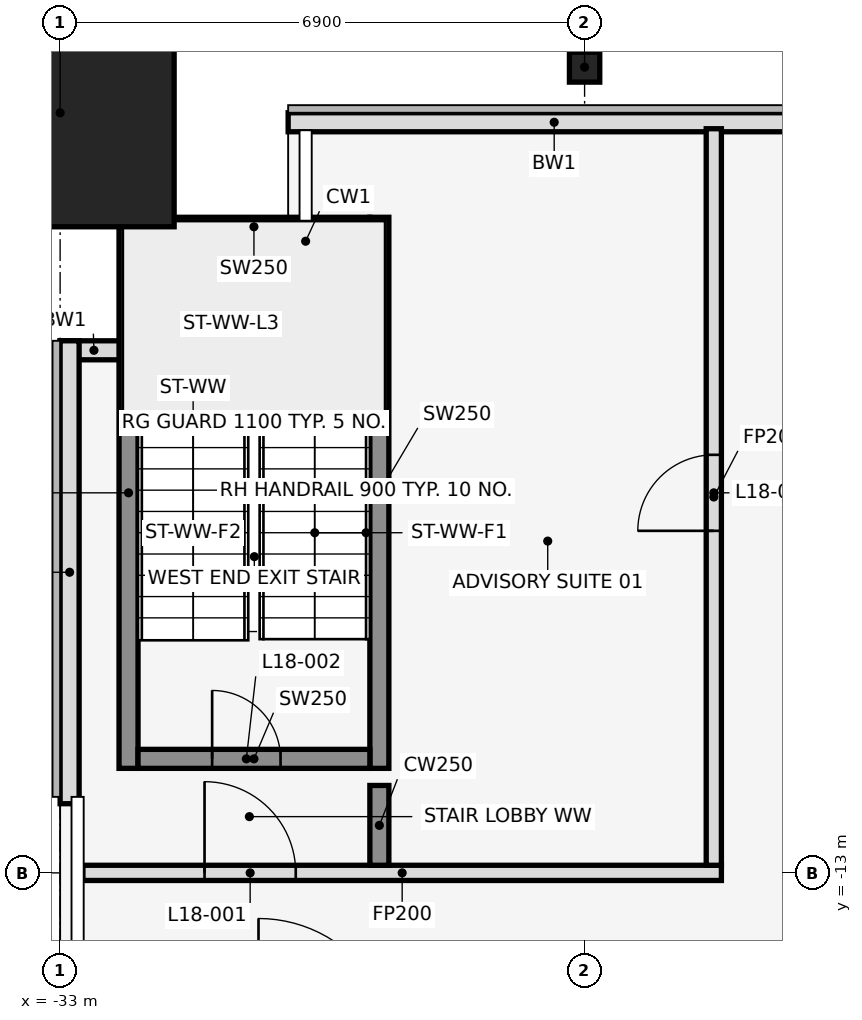
"""IFC4 building model, lengths in metres.
Left out: names, types, materials, properties, quantities, classifications, styles, units other than length and angle.
Written with IfcOpenShell. Run it as: python <this file> out.ifc"""

import sys

from ifc_helpers import new_model, si_unit, direction, frame, frame_2d, origin, origin_2d, place, context, subcontext, project, spatial, rectangle, hollow_rectangle, i_section, extrude, element, fill, save


model = new_model("IFC4")
c1 = context("Model", 3, precision=1e-05, world=origin(), true_north=direction((0.0, 1.0)))
c2 = subcontext(c1, "Body", "Model", "MODEL_VIEW")
j1 = project(units=[si_unit("LENGTHUNIT", "METRE"), si_unit("PLANEANGLEUNIT", "RADIAN")], contexts=[c1])
p1 = place(None, origin())
s1 = spatial("IfcSite", under=j1, at=p1, CompositionType="ELEMENT")
p2 = place(p1, origin())
s2 = spatial("IfcBuilding", under=s1, at=p2, CompositionType="ELEMENT")
p3 = place(p2, frame((0.0, 0.0, 89.9)))
s3 = spatial("IfcBuildingStorey", under=s2, at=p3, CompositionType="ELEMENT", Elevation=89.9)
p4 = place(p3, frame((-33.0, -3.0, 0.0), z_axis=(0.0, 0.0, 1.0), x_axis=(1.0, 0.0, 0.0)))
e1 = element("IfcColumn", 1, at=p4, inside=s3, PredefinedType="COLUMN", context=c2, shape_type="SweptSolid", body=[
    extrude(hollow_rectangle(XDim=3.0, YDim=3.0, WallThickness=0.09, at=origin_2d()), origin(), (0.0, 0.0, 1.0), 4.1),
])
p5 = place(p3, frame((-26.1, -2.4, 0.0), z_axis=(0.0, 0.0, 1.0), x_axis=(1.0, 0.0, 0.0)))
e2 = element("IfcColumn", 2, at=p5, inside=s3, PredefinedType="COLUMN", context=c2, shape_type="SweptSolid", body=[
    extrude(i_section(OverallWidth=0.399, OverallDepth=0.394, WebThickness=0.023, FlangeThickness=0.037, at=origin_2d()), origin(), (0.0, 0.0, 1.0), 4.1),
])
p6 = place(p3, frame((-23.0, -3.125, 0.0), z_axis=(0.0, 0.0, 1.0), x_axis=(-1.0, 0.0, 0.0)))
e3 = element("IfcWall", 3, at=p6, inside=s3, PredefinedType="STANDARD", context=c2, shape_type="SweptSolid", body=[
    extrude(rectangle(XDim=7.0, YDim=0.25, at=frame_2d((3.5, 0.0))), origin(), (0.0, 0.0, 1.0), 3.95),
])
p7 = place(p3, frame((-32.11, -6.125, 0.0), z_axis=(0.0, 0.0, 1.0), x_axis=(-1.0, 0.0, 0.0)))
e4 = element("IfcWall", 4, at=p7, inside=s3, PredefinedType="STANDARD", context=c2, shape_type="SweptSolid", body=[
    extrude(rectangle(XDim=0.89, YDim=0.25, at=frame_2d((0.445, 0.0))), origin(), (0.0, 0.0, 1.0), 3.95),
])
p8 = place(p3, frame((-32.875, -6.0, 0.0), z_axis=(0.0, 0.0, 1.0), x_axis=(0.0, -1.0, 0.0)))
e5 = element("IfcWall", 5, at=p8, inside=s3, PredefinedType="STANDARD", context=c2, shape_type="SweptSolid", body=[
    extrude(rectangle(XDim=6.09, YDim=0.25, at=frame_2d((3.045, 0.0))), origin(), (0.0, 0.0, 1.0), 3.95),
])
for number, where, z_axis, x_axis in (
    (6, (-32.1, -11.625, 0.0), (0.0, 0.0, 1.0), (0.0, 1.0, 0.0)),
    (7, (-28.8, -11.625, 0.0), (0.0, 0.0, 1.0), (0.0, 1.0, 0.0)),
):
    element("IfcWall", number, at=place(p3, frame(where, z_axis=z_axis, x_axis=x_axis)), inside=s3, PredefinedType="SHEAR", context=c2, shape_type="SweptSolid", body=[
        extrude(rectangle(XDim=7.25, YDim=0.25, at=frame_2d((3.625, 0.0))), origin(), (0.0, 0.0, 1.0), 4.1),
    ])
p9 = place(p3, frame((-31.975, -11.5, 0.0), z_axis=(0.0, 0.0, 1.0), x_axis=(1.0, 0.0, 0.0)))
e8 = element("IfcWall", 8, at=p9, inside=s3, PredefinedType="SHEAR", context=c2, shape_type="SweptSolid", body=[
    extrude(rectangle(XDim=3.05, YDim=0.25, at=frame_2d((1.525, 0.0))), origin(), (0.0, 0.0, 1.0), 4.1),
])
p10 = place(p9, frame((0.975, 0.0, 0.0)))
e9 = element("IfcOpeningElement", 9, at=p10, cuts=e8, PredefinedType="OPENING", context=c2, shape_type="SweptSolid", body=[
    extrude(rectangle(XDim=0.9, YDim=2.1, at=frame_2d((0.45, 1.05))), frame((0.0, 0.137, 0.0), z_axis=(0.0, -1.0, 0.0), x_axis=(1.0, 0.0, 0.0)), (0.0, 0.0, 1.0), 0.274),
])
p11 = place(p3, frame((-31.975, -4.5, 0.0), z_axis=(0.0, 0.0, 1.0), x_axis=(1.0, 0.0, 0.0)))
e10 = element("IfcWall", 10, at=p11, inside=s3, PredefinedType="SHEAR", context=c2, shape_type="SweptSolid", body=[
    extrude(rectangle(XDim=3.05, YDim=0.25, at=frame_2d((1.525, 0.0))), origin(), (0.0, 0.0, 1.0), 4.1),
])
p12 = place(p3, frame((-32.7, -13.0, 0.0), z_axis=(0.0, 0.0, 1.0), x_axis=(1.0, 0.0, 0.0)))
e11 = element("IfcWall", 11, at=p12, inside=s3, PredefinedType="PARTITIONING", context=c2, shape_type="SweptSolid", body=[
    extrude(rectangle(XDim=8.4, YDim=0.2, at=frame_2d((4.2, 0.0))), origin(), (0.0, 0.0, 1.0), 3.018),
])
p13 = place(p12, frame((1.6, 0.0, 0.0)))
e12 = element("IfcOpeningElement", 12, at=p13, cuts=e11, PredefinedType="OPENING", context=c2, shape_type="SweptSolid", body=[
    extrude(rectangle(XDim=1.2, YDim=2.1, at=frame_2d((0.6, 1.05))), frame((0.0, 0.112, 0.0), z_axis=(0.0, -1.0, 0.0), x_axis=(1.0, 0.0, 0.0)), (0.0, 0.0, 1.0), 0.224),
])
p14 = place(p3, frame((-28.8, -12.9, 0.0), z_axis=(0.0, 0.0, 1.0), x_axis=(0.0, 1.0, 0.0)))
e13 = element("IfcWall", 13, at=p14, inside=s3, PredefinedType="SHEAR", context=c2, shape_type="SweptSolid", body=[
    extrude(rectangle(XDim=1.05, YDim=0.25, at=frame_2d((0.525, 0.0))), origin(), (0.0, 0.0, 1.0), 4.1),
])
p15 = place(p3, frame((-24.4, -12.9, 0.0), z_axis=(0.0, 0.0, 1.0), x_axis=(0.0, 1.0, 0.0)))
e14 = element("IfcWall", 14, at=p15, inside=s3, PredefinedType="PARTITIONING", context=c2, shape_type="SweptSolid", body=[
    extrude(rectangle(XDim=9.69, YDim=0.2, at=frame_2d((4.845, 0.0))), origin(), (0.0, 0.0, 1.0), 3.018),
])
p16 = place(p15, frame((4.4, 0.0, 0.0)))
e15 = element("IfcOpeningElement", 15, at=p16, cuts=e14, PredefinedType="OPENING", context=c2, shape_type="SweptSolid", body=[
    extrude(rectangle(XDim=1.0, YDim=2.1, at=frame_2d((0.5, 1.05))), frame((0.0, 0.112, 0.0), z_axis=(0.0, -1.0, 0.0), x_axis=(1.0, 0.0, 0.0)), (0.0, 0.0, 1.0), 0.224),
])
p17 = place(p13, origin())
e16 = element("IfcDoor", 16, at=p17, inside=s3, OperationType="SINGLE_SWING_LEFT", PredefinedType="DOOR", context=c2, shape_type="SweptSolid", body=[
    extrude(rectangle(XDim=1.2, YDim=2.1, at=frame_2d((0.6, 1.05))), frame((0.0, 0.025, 0.0), z_axis=(0.0, -1.0, 0.0), x_axis=(1.0, 0.0, 0.0)), (0.0, 0.0, 1.0), 0.05),
])
fill(e12, e16)
p18 = place(p10, origin())
e17 = element("IfcDoor", 17, at=p18, inside=s3, OperationType="SINGLE_SWING_LEFT", PredefinedType="DOOR", context=c2, shape_type="SweptSolid", body=[
    extrude(rectangle(XDim=0.9, YDim=2.1, at=frame_2d((0.45, 1.05))), frame((0.0, 0.025, 0.0), z_axis=(0.0, -1.0, 0.0), x_axis=(1.0, 0.0, 0.0)), (0.0, 0.0, 1.0), 0.05),
])
fill(e9, e17)
p19 = place(p16, origin())
e18 = element("IfcDoor", 18, at=p19, inside=s3, OperationType="SINGLE_SWING_LEFT", PredefinedType="DOOR", context=c2, shape_type="SweptSolid", body=[
    extrude(rectangle(XDim=1.0, YDim=2.1, at=frame_2d((0.5, 1.05))), frame((0.0, 0.025, 0.0), z_axis=(0.0, -1.0, 0.0), x_axis=(1.0, 0.0, 0.0)), (0.0, 0.0, 1.0), 0.05),
])
fill(e15, e18)
save(model, sys.argv[1])
